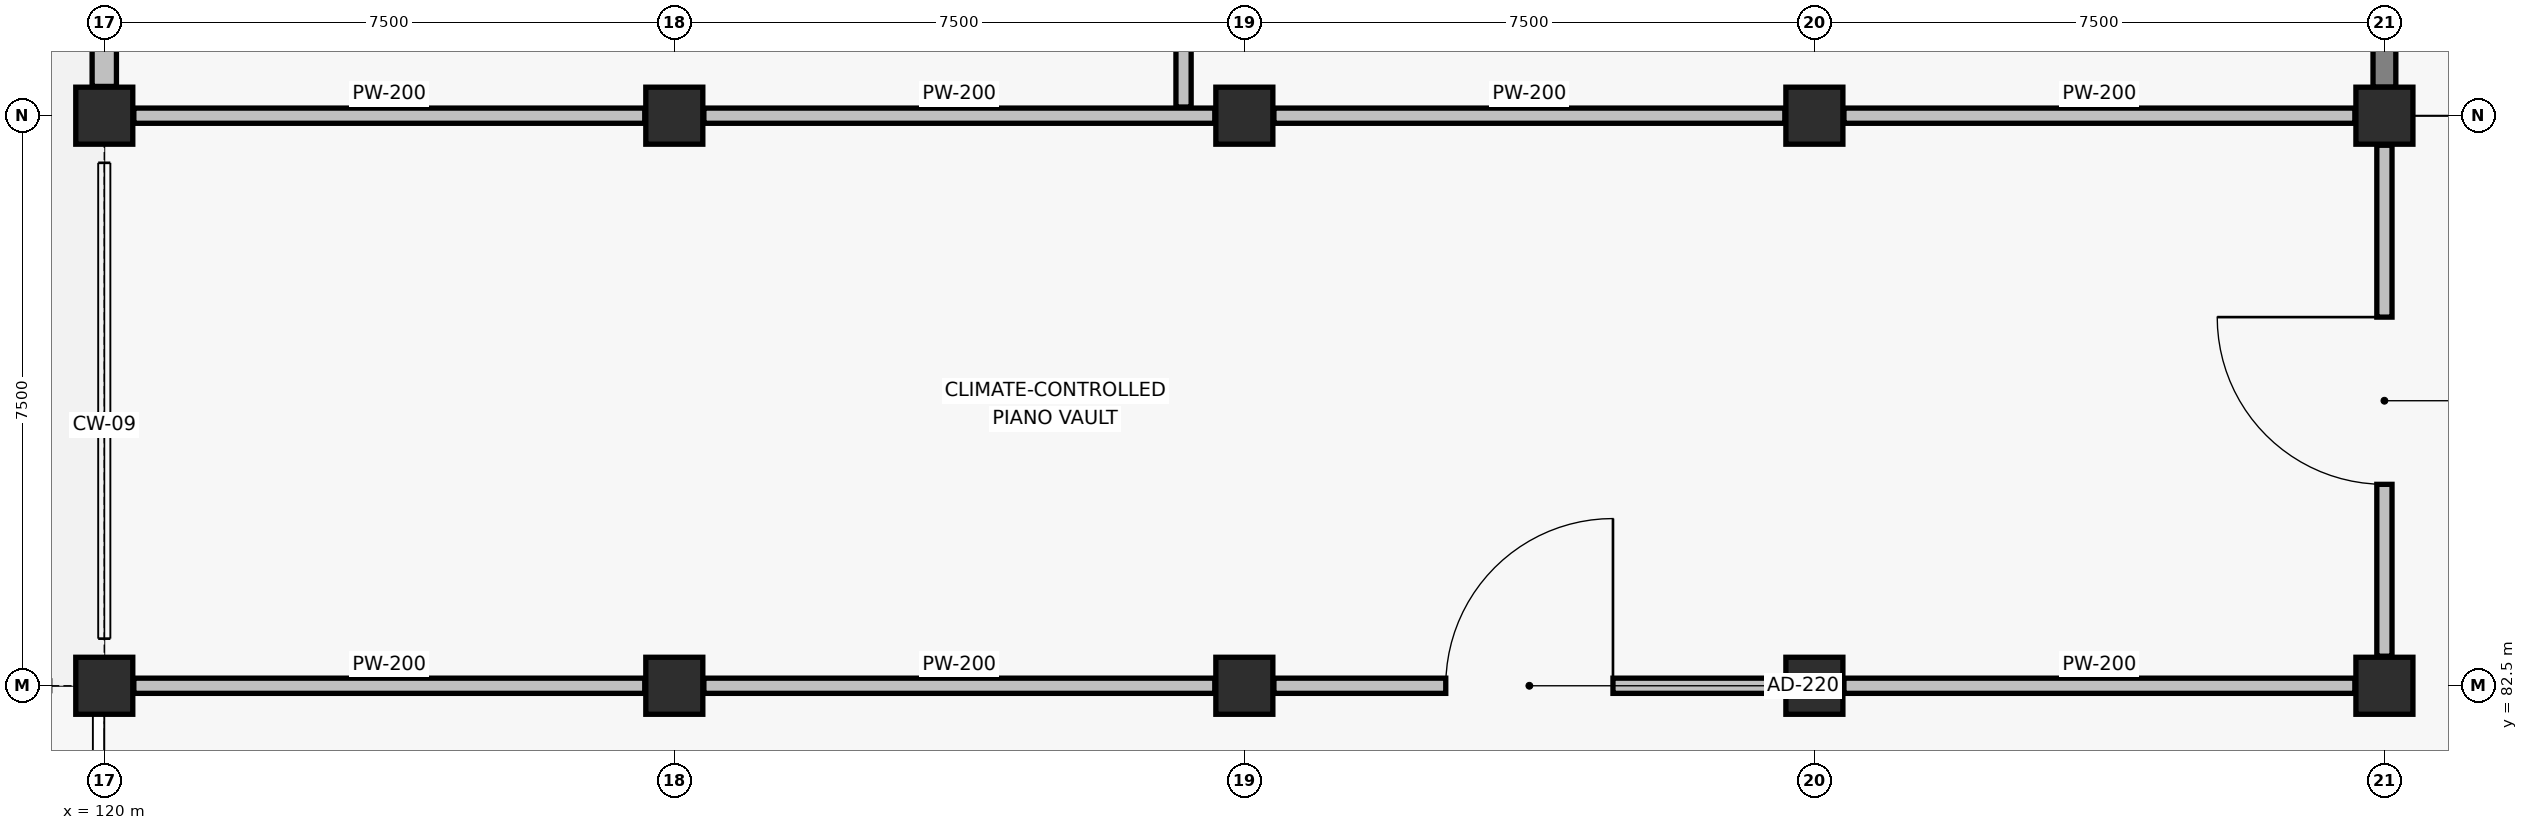
"""IFC4 building model, lengths in metres.
Left out: names, types, materials, properties, quantities, classifications, styles, units other than length and angle.
Written with IfcOpenShell. Run it as: python <this file> out.ifc"""

import sys

from ifc_helpers import new_model, si_unit, direction, frame, frame_2d, origin, origin_2d, place, context, subcontext, project, spatial, rectangle, extrude, element, fill, save


model = new_model("IFC4")
c1 = context("Model", 3, precision=1e-05, world=origin(), true_north=direction((0.0, 1.0)))
c2 = subcontext(c1, "Body", "Model", "MODEL_VIEW")
j1 = project(units=[si_unit("LENGTHUNIT", "METRE"), si_unit("PLANEANGLEUNIT", "RADIAN")], contexts=[c1])
p1 = place(None, origin())
s1 = spatial("IfcSite", under=j1, at=p1, CompositionType="ELEMENT")
p2 = place(p1, origin())
s2 = spatial("IfcBuilding", under=s1, at=p2, CompositionType="ELEMENT")
p3 = place(p2, origin())
s3 = spatial("IfcBuildingStorey", under=s2, at=p3, CompositionType="ELEMENT", Elevation=0.0)
for number, where, z_axis, x_axis in (
    (1, (120.0, 82.5, 0.0), (0.0, 0.0, 1.0), (1.0, 0.0, 0.0)),
    (2, (120.0, 90.0, 0.0), (0.0, 0.0, 1.0), (1.0, 0.0, 0.0)),
    (3, (127.5, 82.5, 0.0), (0.0, 0.0, 1.0), (1.0, 0.0, 0.0)),
    (4, (127.5, 90.0, 0.0), (0.0, 0.0, 1.0), (1.0, 0.0, 0.0)),
    (5, (135.0, 82.5, 0.0), (0.0, 0.0, 1.0), (1.0, 0.0, 0.0)),
    (6, (135.0, 90.0, 0.0), (0.0, 0.0, 1.0), (1.0, 0.0, 0.0)),
    (7, (142.5, 82.5, 0.0), (0.0, 0.0, 1.0), (1.0, 0.0, 0.0)),
    (8, (142.5, 90.0, 0.0), (0.0, 0.0, 1.0), (1.0, 0.0, 0.0)),
    (9, (150.0, 82.5, 0.0), (0.0, 0.0, 1.0), (1.0, 0.0, 0.0)),
    (10, (150.0, 90.0, 0.0), (0.0, 0.0, 1.0), (1.0, 0.0, 0.0)),
):
    element("IfcColumn", number, at=place(p3, frame(where, z_axis=z_axis, x_axis=x_axis)), inside=s3, PredefinedType="COLUMN", context=c2, shape_type="SweptSolid", body=[
        extrude(rectangle(XDim=0.75, YDim=0.75, at=origin_2d()), origin(), (0.0, 0.0, 1.0), 4.8),
    ])
p4 = place(p3, frame((150.0, 90.375, 0.0), z_axis=(0.0, 0.0, 1.0), x_axis=(0.0, 1.0, 0.0)))
e11 = element("IfcWall", 11, at=p4, inside=s3, PredefinedType="SHEAR", context=c2, shape_type="SweptSolid", body=[
    extrude(rectangle(XDim=6.75, YDim=0.3, at=frame_2d((3.375, 0.0))), origin(), (0.0, 0.0, 1.0), 4.5),
])
p5 = place(p3, frame((120.0, 90.385, 0.0), z_axis=(0.0, 0.0, 1.0), x_axis=(0.0, 1.0, 0.0)))
e12 = element("IfcWall", 12, at=p5, inside=s3, PredefinedType="SOLIDWALL", context=c2, shape_type="SweptSolid", body=[
    extrude(rectangle(XDim=6.73, YDim=0.32, at=frame_2d((3.365, 0.0))), origin(), (0.0, 0.0, 1.0), 3.57),
])
p6 = place(p5, frame((2.665, 0.0, 0.6)))
e13 = element("IfcOpeningElement", 13, at=p6, cuts=e12, PredefinedType="OPENING", context=c2, shape_type="SweptSolid", body=[
    extrude(rectangle(XDim=1.4, YDim=1.8, at=frame_2d((0.7, 0.9))), frame((0.0, 0.17, 0.0), z_axis=(0.0, -1.0, 0.0), x_axis=(1.0, 0.0, 0.0)), (0.0, 0.0, 1.0), 0.34),
])
for number, where, z_axis, x_axis in (
    (14, (120.389, 82.5, 0.0), (0.0, 0.0, 1.0), (1.0, 0.0, 0.0)),
    (15, (127.889, 82.5, 0.0), (0.0, 0.0, 1.0), (1.0, 0.0, 0.0)),
):
    element("IfcWall", number, at=place(p3, frame(where, z_axis=z_axis, x_axis=x_axis)), inside=s3, PredefinedType="PARTITIONING", context=c2, shape_type="SweptSolid", body=[
        extrude(rectangle(XDim=6.722, YDim=0.2, at=frame_2d((3.361, 0.0))), origin(), (0.0, 0.0, 1.0), 3.42),
    ])
p7 = place(p3, frame((135.389, 82.5, 0.0), z_axis=(0.0, 0.0, 1.0), x_axis=(1.0, 0.0, 0.0)))
e16 = element("IfcWall", 16, at=p7, inside=s3, PredefinedType="PARTITIONING", context=c2, shape_type="SweptSolid", body=[
    extrude(rectangle(XDim=6.722, YDim=0.2, at=frame_2d((3.361, 0.0))), origin(), (0.0, 0.0, 1.0), 3.42),
])
p8 = place(p7, frame((2.261, 0.0, 0.0)))
e17 = element("IfcOpeningElement", 17, at=p8, cuts=e16, PredefinedType="OPENING", context=c2, shape_type="SweptSolid", body=[
    extrude(rectangle(XDim=2.2, YDim=2.18, at=frame_2d((1.1, 1.09))), frame((0.0, 0.11, 0.0), z_axis=(0.0, -1.0, 0.0), x_axis=(1.0, 0.0, 0.0)), (0.0, 0.0, 1.0), 0.22),
])
p9 = place(p3, frame((142.889, 82.5, 0.0), z_axis=(0.0, 0.0, 1.0), x_axis=(1.0, 0.0, 0.0)))
e18 = element("IfcWall", 18, at=p9, inside=s3, PredefinedType="PARTITIONING", context=c2, shape_type="SweptSolid", body=[
    extrude(rectangle(XDim=6.722, YDim=0.2, at=frame_2d((3.361, 0.0))), origin(), (0.0, 0.0, 1.0), 3.42),
])
for number, where, z_axis, x_axis in (
    (19, (120.389, 90.0, 0.0), (0.0, 0.0, 1.0), (1.0, 0.0, 0.0)),
    (20, (127.889, 90.0, 0.0), (0.0, 0.0, 1.0), (1.0, 0.0, 0.0)),
    (21, (135.389, 90.0, 0.0), (0.0, 0.0, 1.0), (1.0, 0.0, 0.0)),
):
    element("IfcWall", number, at=place(p3, frame(where, z_axis=z_axis, x_axis=x_axis)), inside=s3, PredefinedType="PARTITIONING", context=c2, shape_type="SweptSolid", body=[
        extrude(rectangle(XDim=6.722, YDim=0.2, at=frame_2d((3.361, 0.0))), origin(), (0.0, 0.0, 1.0), 3.52),
    ])
p10 = place(p3, frame((142.889, 90.0, 0.0), z_axis=(0.0, 0.0, 1.0), x_axis=(1.0, 0.0, 0.0)))
e22 = element("IfcWall", 22, at=p10, inside=s3, PredefinedType="PARTITIONING", context=c2, shape_type="SweptSolid", body=[
    extrude(rectangle(XDim=6.722, YDim=0.2, at=frame_2d((3.361, 0.0))), origin(), (0.0, 0.0, 1.0), 3.42),
])
p11 = place(p3, frame((134.2, 90.114, 0.0), z_axis=(0.0, 0.0, 1.0), x_axis=(0.0, 1.0, 0.0)))
e23 = element("IfcWall", 23, at=p11, inside=s3, PredefinedType="PARTITIONING", context=c2, shape_type="SweptSolid", body=[
    extrude(rectangle(XDim=22.202, YDim=0.2, at=frame_2d((11.101, 0.0))), origin(), (0.0, 0.0, 1.0), 3.42),
])
p12 = place(p11, frame((10.236, 0.0, 0.0)))
e24 = element("IfcOpeningElement", 24, at=p12, cuts=e23, PredefinedType="OPENING", context=c2, shape_type="SweptSolid", body=[
    extrude(rectangle(XDim=1.8, YDim=2.18, at=frame_2d((0.9, 1.09))), frame((0.0, 0.11, 0.0), z_axis=(0.0, -1.0, 0.0), x_axis=(1.0, 0.0, 0.0)), (0.0, 0.0, 1.0), 0.22),
])
p13 = place(p3, frame((150.0, 82.889, 0.0), z_axis=(0.0, 0.0, 1.0), x_axis=(0.0, 1.0, 0.0)))
e25 = element("IfcWall", 25, at=p13, inside=s3, PredefinedType="PARTITIONING", context=c2, shape_type="SweptSolid", body=[
    extrude(rectangle(XDim=6.722, YDim=0.2, at=frame_2d((3.361, 0.0))), origin(), (0.0, 0.0, 1.0), 3.42),
])
p14 = place(p13, frame((2.261, 0.0, 0.0)))
e26 = element("IfcOpeningElement", 26, at=p14, cuts=e25, PredefinedType="OPENING", context=c2, shape_type="SweptSolid", body=[
    extrude(rectangle(XDim=2.2, YDim=2.18, at=frame_2d((1.1, 1.09))), frame((0.0, 0.11, 0.0), z_axis=(0.0, -1.0, 0.0), x_axis=(1.0, 0.0, 0.0)), (0.0, 0.0, 1.0), 0.22),
])
p15 = place(p8, origin())
e27 = element("IfcDoor", 27, at=p15, inside=s3, OperationType="SINGLE_SWING_RIGHT", PredefinedType="DOOR", context=c2, shape_type="SweptSolid", body=[
    extrude(rectangle(XDim=2.2, YDim=2.18, at=frame_2d((1.1, 1.09))), frame((0.0, 0.025, 0.0), z_axis=(0.0, -1.0, 0.0), x_axis=(1.0, 0.0, 0.0)), (0.0, 0.0, 1.0), 0.05),
])
fill(e17, e27)
p16 = place(p14, origin())
e28 = element("IfcDoor", 28, at=p16, inside=s3, OperationType="SINGLE_SWING_RIGHT", PredefinedType="DOOR", context=c2, shape_type="SweptSolid", body=[
    extrude(rectangle(XDim=2.2, YDim=2.18, at=frame_2d((1.1, 1.09))), frame((0.0, 0.025, 0.0), z_axis=(0.0, -1.0, 0.0), x_axis=(1.0, 0.0, 0.0)), (0.0, 0.0, 1.0), 0.05),
])
fill(e26, e28)
save(model, sys.argv[1])
